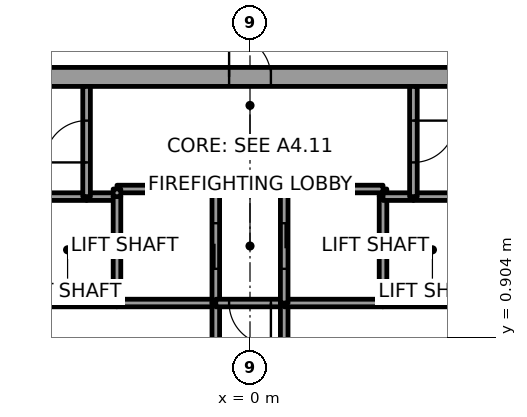
"""IFC4 building model, lengths in metres.
Left out: names, types, materials, properties, quantities, classifications, styles, units other than length and angle.
Written with IfcOpenShell. Run it as: python <this file> out.ifc"""

import sys

from ifc_helpers import new_model, si_unit, direction, frame, frame_2d, origin, place, context, subcontext, project, spatial, rectangle, extrude, element, fill, save


model = new_model("IFC4")
c1 = context("Model", 3, precision=1e-05, world=origin(), true_north=direction((0.0, 1.0)))
c2 = subcontext(c1, "Body", "Model", "MODEL_VIEW")
j1 = project(units=[si_unit("LENGTHUNIT", "METRE"), si_unit("PLANEANGLEUNIT", "RADIAN")], contexts=[c1])
p1 = place(None, origin())
s1 = spatial("IfcSite", under=j1, at=p1, CompositionType="ELEMENT")
p2 = place(p1, origin())
s2 = spatial("IfcBuilding", under=s1, at=p2, CompositionType="ELEMENT")
p3 = place(p2, frame((0.0, 0.0, 55.4)))
s3 = spatial("IfcBuildingStorey", under=s2, at=p3, CompositionType="ELEMENT", Elevation=55.4)
p4 = place(p3, frame((-11.0, 7.75, 0.0), z_axis=(0.0, 0.0, 1.0), x_axis=(1.0, 0.0, 0.0)))
e1 = element("IfcWall", 1, at=p4, inside=s3, PredefinedType="SHEAR", context=c2, shape_type="SweptSolid", body=[
    extrude(rectangle(XDim=22.0, YDim=0.5, at=frame_2d((11.0, 0.0))), origin(), (0.0, 0.0, 1.0), 3.7),
])
p5 = place(p4, frame((10.45, 0.0, 0.0)))
e2 = element("IfcOpeningElement", 2, at=p5, cuts=e1, PredefinedType="OPENING", context=c2, shape_type="SweptSolid", body=[
    extrude(rectangle(XDim=1.1, YDim=2.1, at=frame_2d((0.55, 1.05))), frame((0.0, 0.25, 0.0), z_axis=(0.0, -1.0, 0.0), x_axis=(1.0, 0.0, 0.0)), (0.0, 0.0, 1.0), 0.5),
])
p6 = place(p3, frame((-3.5, 1.8, 0.0), z_axis=(0.0, 0.0, 1.0), x_axis=(-1.0, 0.0, 0.0)))
e3 = element("IfcWall", 3, at=p6, inside=s3, PredefinedType="SOLIDWALL", context=c2, shape_type="SweptSolid", body=[
    extrude(rectangle(XDim=2.6, YDim=0.2, at=frame_2d((1.3, 0.0))), origin(), (0.0, 0.0, 1.0), 3.55),
])
p7 = place(p3, frame((-4.3, 4.6, 0.0), z_axis=(0.0, 0.0, 1.0), x_axis=(-1.0, 0.0, 0.0)))
e4 = element("IfcWall", 4, at=p7, inside=s3, PredefinedType="SOLIDWALL", context=c2, shape_type="SweptSolid", body=[
    extrude(rectangle(XDim=1.8, YDim=0.2, at=frame_2d((0.9, 0.0))), origin(), (0.0, 0.0, 1.0), 3.55),
])
p8 = place(p3, frame((-3.5, 4.6, 0.0), z_axis=(0.0, 0.0, 1.0), x_axis=(-1.0, 0.0, 0.0)))
e5 = element("IfcWall", 5, at=p8, inside=s3, PredefinedType="SOLIDWALL", context=c2, shape_type="SweptSolid", body=[
    extrude(rectangle(XDim=0.8, YDim=0.2, at=frame_2d((0.4, 0.0))), origin(), (0.0, 0.0, 1.0), 3.55),
])
p9 = place(p3, frame((-4.3, 4.6, 0.0), z_axis=(0.0, 0.0, 1.0), x_axis=(0.0, 1.0, 0.0)))
e6 = element("IfcWall", 6, at=p9, inside=s3, PredefinedType="SOLIDWALL", context=c2, shape_type="SweptSolid", body=[
    extrude(rectangle(XDim=2.9, YDim=0.2, at=frame_2d((1.45, 0.0))), origin(), (0.0, 0.0, 1.0), 3.55),
])
p10 = place(p9, frame((0.9, 0.0, 0.0)))
e7 = element("IfcOpeningElement", 7, at=p10, cuts=e6, PredefinedType="OPENING", context=c2, shape_type="SweptSolid", body=[
    extrude(rectangle(XDim=1.1, YDim=2.1, at=frame_2d((0.55, 1.05))), frame((0.0, 0.1, 0.0), z_axis=(0.0, -1.0, 0.0), x_axis=(1.0, 0.0, 0.0)), (0.0, 0.0, 1.0), 0.2),
])
p11 = place(p3, frame((-0.9, 1.8, 0.0), z_axis=(0.0, 0.0, 1.0), x_axis=(-1.0, 0.0, 0.0)))
e8 = element("IfcWall", 8, at=p11, inside=s3, PredefinedType="SOLIDWALL", context=c2, shape_type="SweptSolid", body=[
    extrude(rectangle(XDim=2.6, YDim=0.2, at=frame_2d((1.3, 0.0))), origin(), (0.0, 0.0, 1.0), 3.55),
])
p12 = place(p3, frame((-3.5, 4.6, 0.0), z_axis=(0.0, 0.0, 1.0), x_axis=(0.0, -1.0, 0.0)))
e9 = element("IfcWall", 9, at=p12, inside=s3, PredefinedType="SOLIDWALL", context=c2, shape_type="SweptSolid", body=[
    extrude(rectangle(XDim=2.8, YDim=0.2, at=frame_2d((1.4, 0.0))), origin(), (0.0, 0.0, 1.0), 3.55),
])
p13 = place(p3, frame((-0.9, 1.8, 0.0), z_axis=(0.0, 0.0, 1.0), x_axis=(0.0, 1.0, 0.0)))
e10 = element("IfcWall", 10, at=p13, inside=s3, PredefinedType="SOLIDWALL", context=c2, shape_type="SweptSolid", body=[
    extrude(rectangle(XDim=3.0, YDim=0.2, at=frame_2d((1.5, 0.0))), origin(), (0.0, 0.0, 1.0), 3.55),
])
p14 = place(p13, frame((0.9, 0.0, 0.0)))
e11 = element("IfcOpeningElement", 11, at=p14, cuts=e10, PredefinedType="OPENING", context=c2, shape_type="SweptSolid", body=[
    extrude(rectangle(XDim=1.2, YDim=2.1, at=frame_2d((0.6, 1.05))), frame((0.0, 0.1, 0.0), z_axis=(0.0, -1.0, 0.0), x_axis=(1.0, 0.0, 0.0)), (0.0, 0.0, 1.0), 0.2),
])
p15 = place(p3, frame((-0.9, 4.8, 0.0), z_axis=(0.0, 0.0, 1.0), x_axis=(-1.0, 0.0, 0.0)))
e12 = element("IfcWall", 12, at=p15, inside=s3, PredefinedType="SOLIDWALL", context=c2, shape_type="SweptSolid", body=[
    extrude(rectangle(XDim=2.6, YDim=0.2, at=frame_2d((1.3, 0.0))), origin(), (0.0, 0.0, 1.0), 3.55),
])
p16 = place(p3, frame((-3.5, 4.8, 0.0), z_axis=(0.0, 0.0, 1.0), x_axis=(0.0, -1.0, 0.0)))
e13 = element("IfcWall", 13, at=p16, inside=s3, PredefinedType="SOLIDWALL", context=c2, shape_type="SweptSolid", body=[
    extrude(rectangle(XDim=0.2, YDim=0.2, at=frame_2d((0.1, 0.0))), origin(), (0.0, 0.0, 1.0), 3.55),
])
p17 = place(p3, frame((-0.9, 1.8, 0.0), z_axis=(0.0, 0.0, 1.0), x_axis=(0.0, -1.0, 0.0)))
e14 = element("IfcWall", 14, at=p17, inside=s3, PredefinedType="SOLIDWALL", context=c2, shape_type="SweptSolid", body=[
    extrude(rectangle(XDim=3.6, YDim=0.2, at=frame_2d((1.8, 0.0))), origin(), (0.0, 0.0, 1.0), 3.55),
])
p18 = place(p17, frame((1.05, 0.0, 0.0)))
e15 = element("IfcOpeningElement", 15, at=p18, cuts=e14, PredefinedType="OPENING", context=c2, shape_type="SweptSolid", body=[
    extrude(rectangle(XDim=1.5, YDim=2.1, at=frame_2d((0.75, 1.05))), frame((0.0, 0.1, 0.0), z_axis=(0.0, -1.0, 0.0), x_axis=(1.0, 0.0, 0.0)), (0.0, 0.0, 1.0), 0.2),
])
p19 = place(p3, frame((0.9, 1.8, 0.0), z_axis=(0.0, 0.0, 1.0), x_axis=(-1.0, 0.0, 0.0)))
e16 = element("IfcWall", 16, at=p19, inside=s3, PredefinedType="SOLIDWALL", context=c2, shape_type="SweptSolid", body=[
    extrude(rectangle(XDim=1.8, YDim=0.2, at=frame_2d((0.9, 0.0))), origin(), (0.0, 0.0, 1.0), 3.55),
])
p20 = place(p19, frame((0.35, 0.0, 0.0)))
e17 = element("IfcOpeningElement", 17, at=p20, cuts=e16, PredefinedType="OPENING", context=c2, shape_type="SweptSolid", body=[
    extrude(rectangle(XDim=1.1, YDim=2.1, at=frame_2d((0.55, 1.05))), frame((0.0, 0.1, 0.0), z_axis=(0.0, -1.0, 0.0), x_axis=(1.0, 0.0, 0.0)), (0.0, 0.0, 1.0), 0.2),
])
p21 = place(p3, frame((0.9, -1.8, 0.0), z_axis=(0.0, 0.0, 1.0), x_axis=(0.0, 1.0, 0.0)))
e18 = element("IfcWall", 18, at=p21, inside=s3, PredefinedType="SOLIDWALL", context=c2, shape_type="SweptSolid", body=[
    extrude(rectangle(XDim=3.6, YDim=0.2, at=frame_2d((1.8, 0.0))), origin(), (0.0, 0.0, 1.0), 3.55),
])
p22 = place(p21, frame((1.05, 0.0, 0.0)))
e19 = element("IfcOpeningElement", 19, at=p22, cuts=e18, PredefinedType="OPENING", context=c2, shape_type="SweptSolid", body=[
    extrude(rectangle(XDim=1.5, YDim=2.1, at=frame_2d((0.75, 1.05))), frame((0.0, 0.1, 0.0), z_axis=(0.0, -1.0, 0.0), x_axis=(1.0, 0.0, 0.0)), (0.0, 0.0, 1.0), 0.2),
])
p23 = place(p3, frame((3.5, 1.8, 0.0), z_axis=(0.0, 0.0, 1.0), x_axis=(-1.0, 0.0, 0.0)))
e20 = element("IfcWall", 20, at=p23, inside=s3, PredefinedType="SOLIDWALL", context=c2, shape_type="SweptSolid", body=[
    extrude(rectangle(XDim=2.6, YDim=0.2, at=frame_2d((1.3, 0.0))), origin(), (0.0, 0.0, 1.0), 3.55),
])
p24 = place(p3, frame((3.5, 4.6, 0.0), z_axis=(0.0, 0.0, 1.0), x_axis=(0.0, 1.0, 0.0)))
e21 = element("IfcWall", 21, at=p24, inside=s3, PredefinedType="SOLIDWALL", context=c2, shape_type="SweptSolid", body=[
    extrude(rectangle(XDim=0.2, YDim=0.2, at=frame_2d((0.1, 0.0))), origin(), (0.0, 0.0, 1.0), 3.55),
])
p25 = place(p3, frame((3.5, 4.8, 0.0), z_axis=(0.0, 0.0, 1.0), x_axis=(-1.0, 0.0, 0.0)))
e22 = element("IfcWall", 22, at=p25, inside=s3, PredefinedType="SOLIDWALL", context=c2, shape_type="SweptSolid", body=[
    extrude(rectangle(XDim=2.6, YDim=0.2, at=frame_2d((1.3, 0.0))), origin(), (0.0, 0.0, 1.0), 3.55),
])
p26 = place(p3, frame((0.9, 4.8, 0.0), z_axis=(0.0, 0.0, 1.0), x_axis=(0.0, -1.0, 0.0)))
e23 = element("IfcWall", 23, at=p26, inside=s3, PredefinedType="SOLIDWALL", context=c2, shape_type="SweptSolid", body=[
    extrude(rectangle(XDim=3.0, YDim=0.2, at=frame_2d((1.5, 0.0))), origin(), (0.0, 0.0, 1.0), 3.55),
])
p27 = place(p26, frame((0.9, 0.0, 0.0)))
e24 = element("IfcOpeningElement", 24, at=p27, cuts=e23, PredefinedType="OPENING", context=c2, shape_type="SweptSolid", body=[
    extrude(rectangle(XDim=1.2, YDim=2.1, at=frame_2d((0.6, 1.05))), frame((0.0, 0.1, 0.0), z_axis=(0.0, -1.0, 0.0), x_axis=(1.0, 0.0, 0.0)), (0.0, 0.0, 1.0), 0.2),
])
p28 = place(p3, frame((6.1, 1.8, 0.0), z_axis=(0.0, 0.0, 1.0), x_axis=(-1.0, 0.0, 0.0)))
e25 = element("IfcWall", 25, at=p28, inside=s3, PredefinedType="SOLIDWALL", context=c2, shape_type="SweptSolid", body=[
    extrude(rectangle(XDim=2.6, YDim=0.2, at=frame_2d((1.3, 0.0))), origin(), (0.0, 0.0, 1.0), 3.55),
])
p29 = place(p3, frame((3.5, 1.8, 0.0), z_axis=(0.0, 0.0, 1.0), x_axis=(0.0, 1.0, 0.0)))
e26 = element("IfcWall", 26, at=p29, inside=s3, PredefinedType="SOLIDWALL", context=c2, shape_type="SweptSolid", body=[
    extrude(rectangle(XDim=2.8, YDim=0.2, at=frame_2d((1.4, 0.0))), origin(), (0.0, 0.0, 1.0), 3.55),
])
p30 = place(p3, frame((4.3, 4.6, 0.0), z_axis=(0.0, 0.0, 1.0), x_axis=(-1.0, 0.0, 0.0)))
e27 = element("IfcWall", 27, at=p30, inside=s3, PredefinedType="SOLIDWALL", context=c2, shape_type="SweptSolid", body=[
    extrude(rectangle(XDim=0.8, YDim=0.2, at=frame_2d((0.4, 0.0))), origin(), (0.0, 0.0, 1.0), 3.55),
])
p31 = place(p3, frame((6.1, 4.6, 0.0), z_axis=(0.0, 0.0, 1.0), x_axis=(-1.0, 0.0, 0.0)))
e28 = element("IfcWall", 28, at=p31, inside=s3, PredefinedType="SOLIDWALL", context=c2, shape_type="SweptSolid", body=[
    extrude(rectangle(XDim=1.8, YDim=0.2, at=frame_2d((0.9, 0.0))), origin(), (0.0, 0.0, 1.0), 3.55),
])
p32 = place(p3, frame((4.3, 7.5, 0.0), z_axis=(0.0, 0.0, 1.0), x_axis=(0.0, -1.0, 0.0)))
e29 = element("IfcWall", 29, at=p32, inside=s3, PredefinedType="SOLIDWALL", context=c2, shape_type="SweptSolid", body=[
    extrude(rectangle(XDim=2.9, YDim=0.2, at=frame_2d((1.45, 0.0))), origin(), (0.0, 0.0, 1.0), 3.55),
])
p33 = place(p32, frame((0.9, 0.0, 0.0)))
e30 = element("IfcOpeningElement", 30, at=p33, cuts=e29, PredefinedType="OPENING", context=c2, shape_type="SweptSolid", body=[
    extrude(rectangle(XDim=1.1, YDim=2.1, at=frame_2d((0.55, 1.05))), frame((0.0, 0.1, 0.0), z_axis=(0.0, -1.0, 0.0), x_axis=(1.0, 0.0, 0.0)), (0.0, 0.0, 1.0), 0.2),
])
p34 = place(p14, origin())
e31 = element("IfcDoor", 31, at=p34, inside=s3, OperationType="SLIDING_TO_RIGHT", PredefinedType="DOOR", context=c2, shape_type="SweptSolid", body=[
    extrude(rectangle(XDim=1.2, YDim=2.1, at=frame_2d((0.6, 1.05))), frame((0.0, 0.025, 0.0), z_axis=(0.0, -1.0, 0.0), x_axis=(1.0, 0.0, 0.0)), (0.0, 0.0, 1.0), 0.05),
])
fill(e11, e31)
p35 = place(p27, origin())
e32 = element("IfcDoor", 32, at=p35, inside=s3, OperationType="SLIDING_TO_RIGHT", PredefinedType="DOOR", context=c2, shape_type="SweptSolid", body=[
    extrude(rectangle(XDim=1.2, YDim=2.1, at=frame_2d((0.6, 1.05))), frame((0.0, 0.025, 0.0), z_axis=(0.0, -1.0, 0.0), x_axis=(1.0, 0.0, 0.0)), (0.0, 0.0, 1.0), 0.05),
])
fill(e24, e32)
p36 = place(p20, origin())
e33 = element("IfcDoor", 33, at=p36, inside=s3, OperationType="SINGLE_SWING_RIGHT", PredefinedType="DOOR", context=c2, shape_type="SweptSolid", body=[
    extrude(rectangle(XDim=1.1, YDim=2.1, at=frame_2d((0.55, 1.05))), frame((0.0, 0.025, 0.0), z_axis=(0.0, -1.0, 0.0), x_axis=(1.0, 0.0, 0.0)), (0.0, 0.0, 1.0), 0.05),
])
fill(e17, e33)
p37 = place(p10, origin())
e34 = element("IfcDoor", 34, at=p37, inside=s3, OperationType="SINGLE_SWING_RIGHT", PredefinedType="DOOR", context=c2, shape_type="SweptSolid", body=[
    extrude(rectangle(XDim=1.1, YDim=2.1, at=frame_2d((0.55, 1.05))), frame((0.0, 0.025, 0.0), z_axis=(0.0, -1.0, 0.0), x_axis=(1.0, 0.0, 0.0)), (0.0, 0.0, 1.0), 0.05),
])
fill(e7, e34)
p38 = place(p33, origin())
e35 = element("IfcDoor", 35, at=p38, inside=s3, OperationType="SINGLE_SWING_LEFT", PredefinedType="DOOR", context=c2, shape_type="SweptSolid", body=[
    extrude(rectangle(XDim=1.1, YDim=2.1, at=frame_2d((0.55, 1.05))), frame((0.0, 0.025, 0.0), z_axis=(0.0, -1.0, 0.0), x_axis=(1.0, 0.0, 0.0)), (0.0, 0.0, 1.0), 0.05),
])
fill(e30, e35)
p39 = place(p5, origin())
e36 = element("IfcDoor", 36, at=p39, inside=s3, OperationType="SINGLE_SWING_RIGHT", PredefinedType="DOOR", context=c2, shape_type="SweptSolid", body=[
    extrude(rectangle(XDim=1.1, YDim=2.1, at=frame_2d((0.55, 1.05))), frame((0.0, 0.025, 0.0), z_axis=(0.0, -1.0, 0.0), x_axis=(1.0, 0.0, 0.0)), (0.0, 0.0, 1.0), 0.05),
])
fill(e2, e36)
save(model, sys.argv[1])
